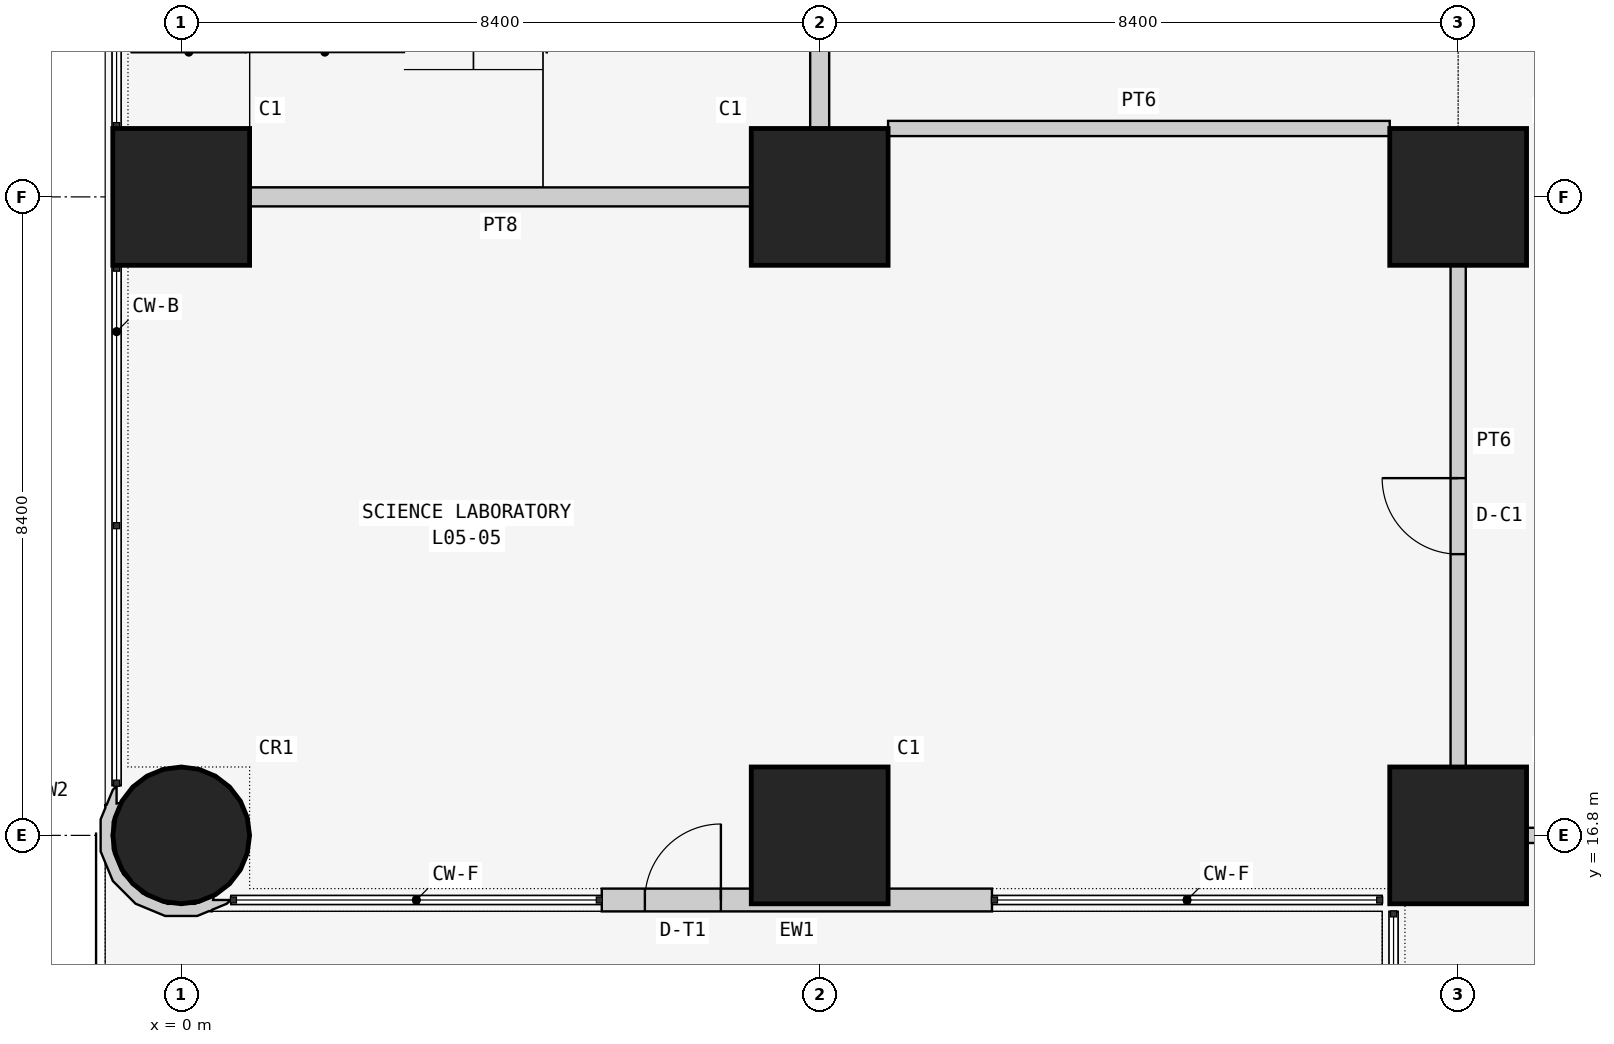
"""IFC4 building model, lengths in metres.
Left out: names, types, materials, properties, quantities, classifications, styles, units other than length and angle.
Written with IfcOpenShell. Run it as: python <this file> out.ifc"""

import sys

from ifc_helpers import new_model, si_unit, direction, frame, frame_2d, origin, origin_2d, place, context, subcontext, project, spatial, polyline, rectangle, circle, outline, extrude, element, fill, save


model = new_model("IFC4")
c1 = context("Model", 3, precision=1e-05, world=origin(), true_north=direction((0.0, 1.0)))
c2 = subcontext(c1, "Body", "Model", "MODEL_VIEW")
j1 = project(units=[si_unit("LENGTHUNIT", "METRE"), si_unit("PLANEANGLEUNIT", "RADIAN")], contexts=[c1])
p1 = place(None, origin())
s1 = spatial("IfcSite", under=j1, at=p1, CompositionType="ELEMENT")
p2 = place(p1, origin())
s2 = spatial("IfcBuilding", under=s1, at=p2, CompositionType="ELEMENT")
p3 = place(p2, frame((0.0, 0.0, 24.0)))
s3 = spatial("IfcBuildingStorey", under=s2, at=p3, CompositionType="ELEMENT", Elevation=24.0)
p4 = place(p3, frame((0.0, 16.8, 0.0), z_axis=(0.0, 0.0, 1.0), x_axis=(1.0, 0.0, 0.0)))
e1 = element("IfcColumn", 1, at=p4, inside=s3, PredefinedType="COLUMN", context=c2, shape_type="SweptSolid", body=[
    extrude(circle(Radius=0.9, at=origin_2d()), origin(), (0.0, 0.0, 1.0), 4.5),
])
for number, where, z_axis, x_axis in (
    (2, (0.0, 25.2, 0.0), (0.0, 0.0, 1.0), (1.0, 0.0, 0.0)),
    (3, (8.4, 16.8, 0.0), (0.0, 0.0, 1.0), (1.0, 0.0, 0.0)),
    (4, (8.4, 25.2, 0.0), (0.0, 0.0, 1.0), (1.0, 0.0, 0.0)),
    (5, (16.8, 16.8, 0.0), (0.0, 0.0, 1.0), (1.0, 0.0, 0.0)),
    (6, (16.8, 25.2, 0.0), (0.0, 0.0, 1.0), (1.0, 0.0, 0.0)),
):
    element("IfcColumn", number, at=place(p3, frame(where, z_axis=z_axis, x_axis=x_axis)), inside=s3, PredefinedType="COLUMN", context=c2, shape_type="SweptSolid", body=[
        extrude(rectangle(XDim=1.8, YDim=1.8, at=origin_2d()), origin(), (0.0, 0.0, 1.0), 4.5),
    ])
p5 = place(p3, frame((5.533, 15.95, 0.0), z_axis=(0.0, 0.0, 1.0), x_axis=(1.0, 0.0, 0.0)))
e7 = element("IfcWall", 7, at=p5, inside=s3, PredefinedType="SOLIDWALL", context=c2, shape_type="SweptSolid", body=[
    extrude(rectangle(XDim=5.134, YDim=0.3, at=frame_2d((2.567, 0.0))), origin(), (0.0, 0.0, 1.0), 4.25),
])
p6 = place(p5, frame((0.567, 0.0, 0.0)))
e8 = element("IfcOpeningElement", 8, at=p6, cuts=e7, PredefinedType="OPENING", context=c2, shape_type="SweptSolid", body=[
    extrude(rectangle(XDim=1.0, YDim=2.4, at=frame_2d((0.5, 1.2))), frame((0.0, 0.16, 0.0), z_axis=(0.0, -1.0, 0.0), x_axis=(1.0, 0.0, 0.0)), (0.0, 0.0, 1.0), 0.32),
])
p7 = place(p3, frame((-0.779, 17.395, 0.0), z_axis=(0.0, 0.0, 1.0), x_axis=(-0.707106781187, -0.707106781187, 0.0)))
e9 = element("IfcWall", 9, at=p7, inside=s3, PredefinedType="SOLIDWALL", context=c2, shape_type="SweptSolid", body=[
    extrude(outline(polyline([(0.294, 1.961), (0.279, 1.949), (0.081, 2.031), (0.012, 2.031), (0.174, 1.869), (0.133, 1.838), (0.38, 1.735), (0.634, 1.482), (0.771, 1.15), (0.771, 0.792), (0.634, 0.461), (0.38, 0.208), (0.133, 0.105), (0.174, 0.073), (0.012, -0.089), (0.081, -0.089), (0.279, -0.007), (0.294, -0.019), (0.315, 0.008), (0.47, 0.073), (0.769, 0.371), (0.93, 0.76), (0.93, 1.182), (0.768, 1.572), (0.47, 1.87), (0.315, 1.934), (0.294, 1.961)])), origin(), (0.0, 0.0, 1.0), 4.25),
])
p8 = place(p3, frame((7.5, 25.2, 0.0), z_axis=(0.0, 0.0, 1.0), x_axis=(-1.0, 0.0, 0.0)))
e10 = element("IfcWall", 10, at=p8, inside=s3, PredefinedType="SOLIDWALL", context=c2, shape_type="SweptSolid", body=[
    extrude(rectangle(XDim=6.6, YDim=0.25, at=frame_2d((3.3, 0.0))), origin(), (0.0, 0.0, 1.0), 3.409),
])
p9 = place(p3, frame((8.4, 32.7, 0.0), z_axis=(0.0, 0.0, 1.0), x_axis=(0.0, -1.0, 0.0)))
e11 = element("IfcWall", 11, at=p9, inside=s3, PredefinedType="SOLIDWALL", context=c2, shape_type="SweptSolid", body=[
    extrude(rectangle(XDim=6.6, YDim=0.25, at=frame_2d((3.3, 0.0))), origin(), (0.0, 0.0, 1.0), 3.409),
])
p10 = place(p9, frame((2.0, 0.0, 0.0)))
e12 = element("IfcOpeningElement", 12, at=p10, cuts=e11, PredefinedType="OPENING", context=c2, shape_type="SweptSolid", body=[
    extrude(rectangle(XDim=2.6, YDim=2.4, at=frame_2d((1.3, 1.2))), frame((0.0, 0.135, 0.0), z_axis=(0.0, -1.0, 0.0), x_axis=(1.0, 0.0, 0.0)), (0.0, 0.0, 1.0), 0.27),
])
p11 = place(p3, frame((17.7, 16.8, 0.0), z_axis=(0.0, 0.0, 1.0), x_axis=(1.0, 0.0, 0.0)))
e13 = element("IfcWall", 13, at=p11, inside=s3, PredefinedType="PARTITIONING", context=c2, shape_type="SweptSolid", body=[
    extrude(rectangle(XDim=2.8, YDim=0.2, at=frame_2d((1.4, 0.0))), origin(), (0.0, 0.0, 1.0), 3.409),
])
p12 = place(p3, frame((9.3, 26.1, 0.0), z_axis=(0.0, 0.0, 1.0), x_axis=(1.0, 0.0, 0.0)))
e14 = element("IfcWall", 14, at=p12, inside=s3, PredefinedType="PARTITIONING", context=c2, shape_type="SweptSolid", body=[
    extrude(rectangle(XDim=6.6, YDim=0.2, at=frame_2d((3.3, 0.0))), origin(), (0.0, 0.0, 1.0), 4.25),
])
p13 = place(p3, frame((16.8, 24.3, 0.0), z_axis=(0.0, 0.0, 1.0), x_axis=(0.0, -1.0, 0.0)))
e15 = element("IfcWall", 15, at=p13, inside=s3, PredefinedType="PARTITIONING", context=c2, shape_type="SweptSolid", body=[
    extrude(rectangle(XDim=6.6, YDim=0.2, at=frame_2d((3.3, 0.0))), origin(), (0.0, 0.0, 1.0), 3.409),
])
p14 = place(p13, frame((2.8, 0.0, 0.0)))
e16 = element("IfcOpeningElement", 16, at=p14, cuts=e15, PredefinedType="OPENING", context=c2, shape_type="SweptSolid", body=[
    extrude(rectangle(XDim=1.0, YDim=2.1, at=frame_2d((0.5, 1.05))), frame((0.0, 0.11, 0.0), z_axis=(0.0, -1.0, 0.0), x_axis=(1.0, 0.0, 0.0)), (0.0, 0.0, 1.0), 0.22),
])
p15 = place(p6, origin())
e17 = element("IfcDoor", 17, at=p15, inside=s3, OperationType="SINGLE_SWING_RIGHT", PredefinedType="DOOR", context=c2, shape_type="SweptSolid", body=[
    extrude(rectangle(XDim=1.0, YDim=2.4, at=frame_2d((0.5, 1.2))), frame((0.0, 0.025, 0.0), z_axis=(0.0, -1.0, 0.0), x_axis=(1.0, 0.0, 0.0)), (0.0, 0.0, 1.0), 0.05),
])
fill(e8, e17)
p16 = place(p14, frame((1.0, 0.0, 0.0), z_axis=(0.0, 0.0, 1.0), x_axis=(-1.0, 0.0, 0.0)))
e18 = element("IfcDoor", 18, at=p16, inside=s3, OperationType="SINGLE_SWING_RIGHT", PredefinedType="DOOR", context=c2, shape_type="SweptSolid", body=[
    extrude(rectangle(XDim=1.0, YDim=2.1, at=frame_2d((0.5, 1.05))), frame((0.0, 0.025, 0.0), z_axis=(0.0, -1.0, 0.0), x_axis=(1.0, 0.0, 0.0)), (0.0, 0.0, 1.0), 0.05),
])
fill(e16, e18)
save(model, sys.argv[1])
